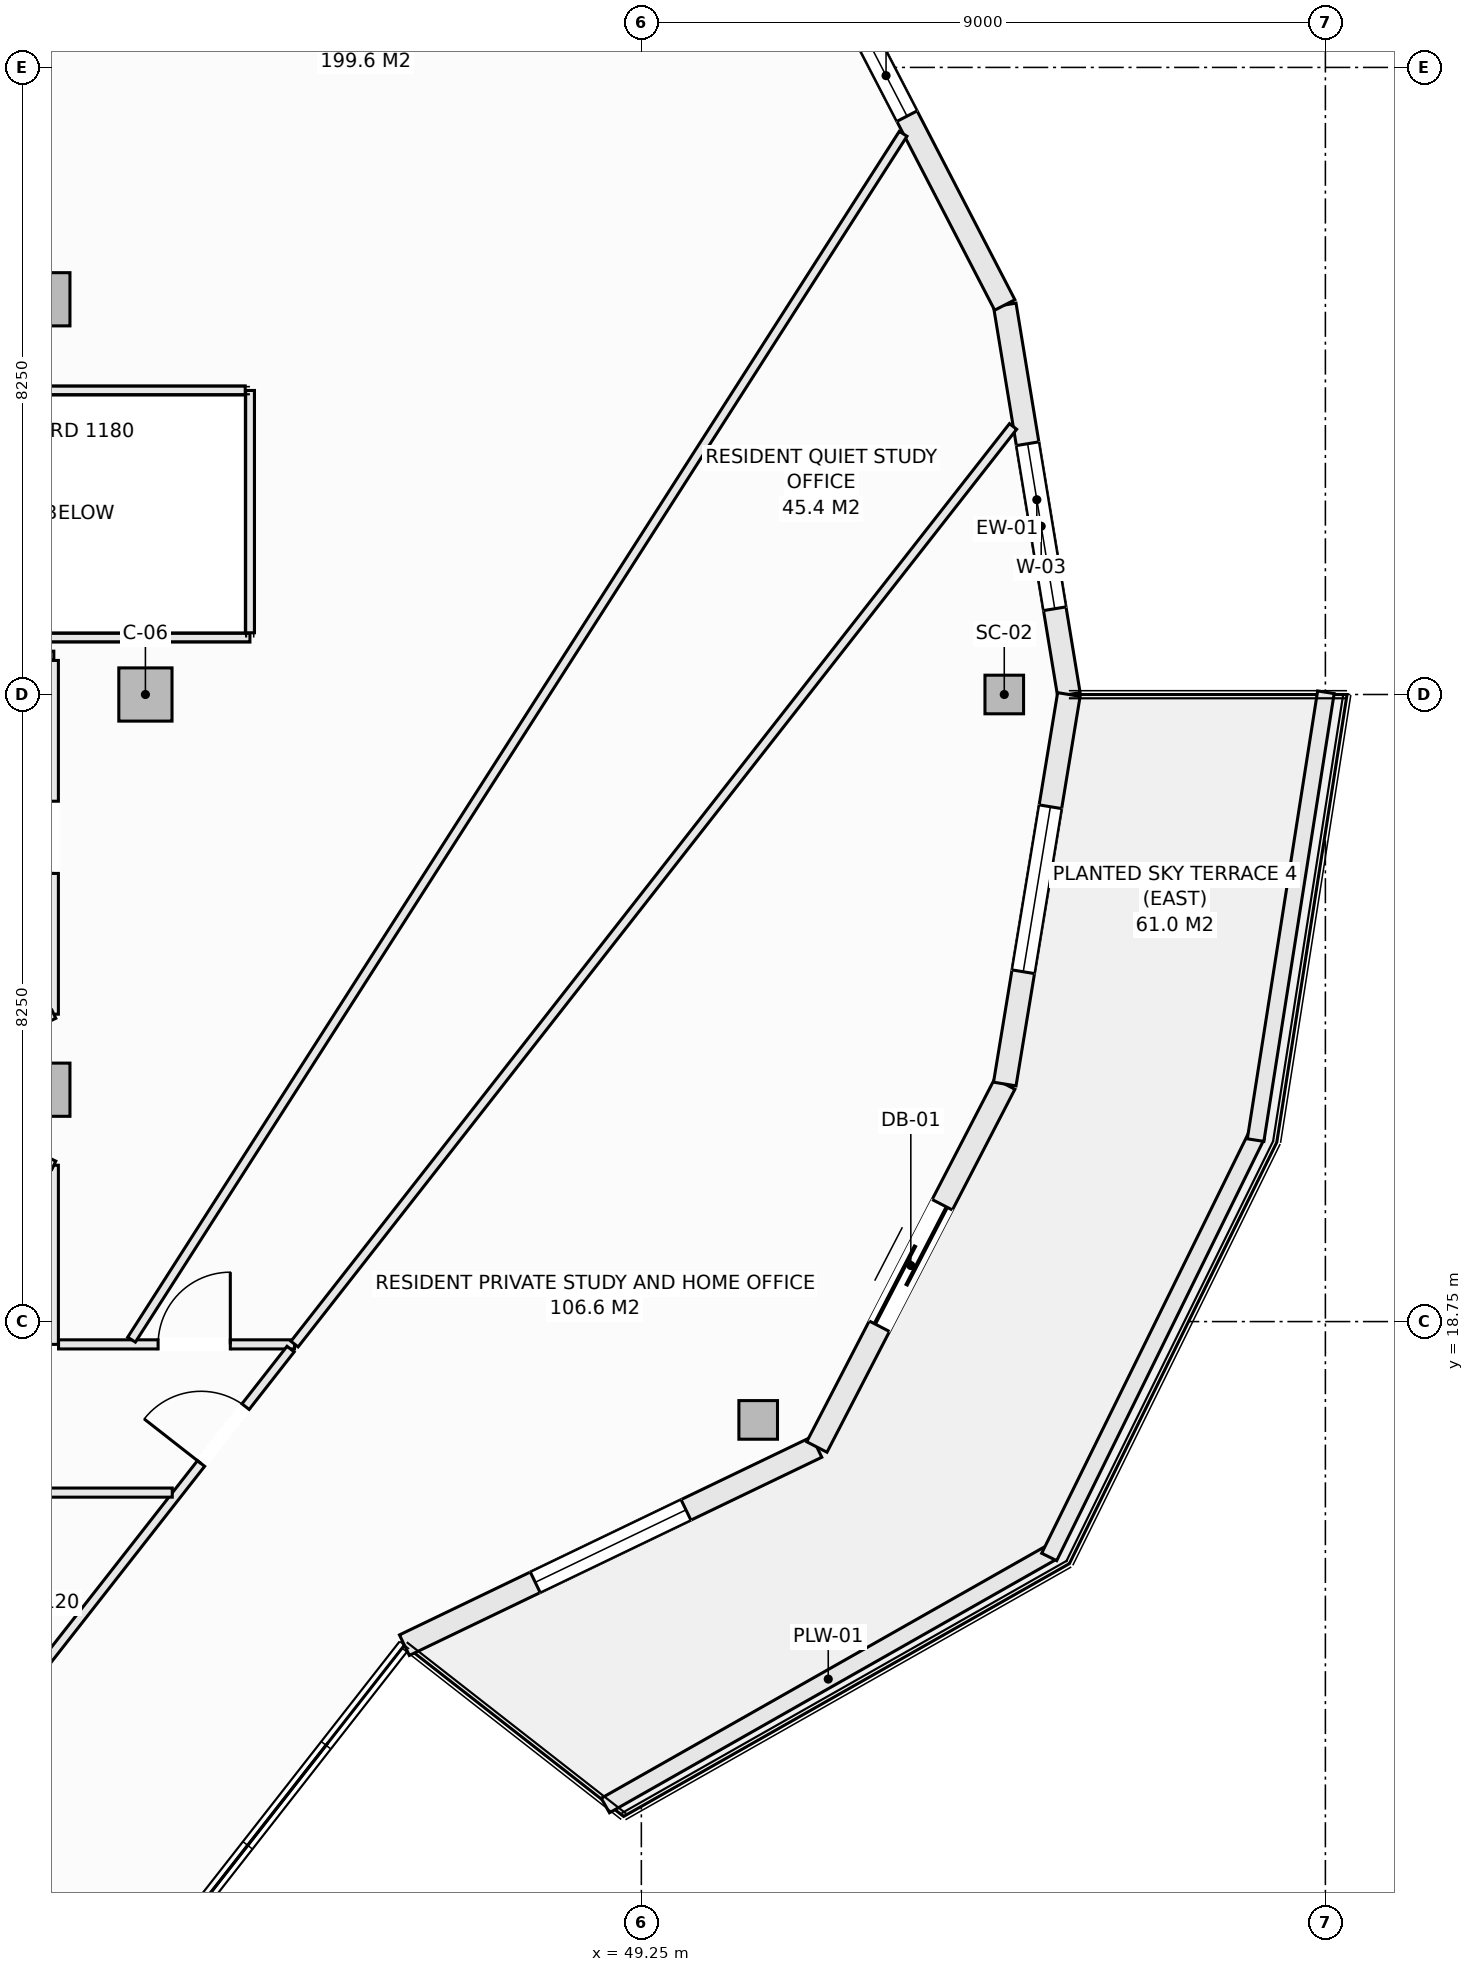
"""IFC4 building model, lengths in metres.
Left out: names, types, materials, properties, quantities, classifications, styles, units other than length and angle.
Written with IfcOpenShell. Run it as: python <this file> out.ifc"""

import sys

from ifc_helpers import new_model, si_unit, direction, frame, frame_2d, origin, origin_2d, place, context, subcontext, project, spatial, rectangle, hollow_rectangle, extrude, element, fill, save


model = new_model("IFC4")
c1 = context("Model", 3, precision=1e-05, world=origin(), true_north=direction((0.0, 1.0)))
c2 = subcontext(c1, "Body", "Model", "MODEL_VIEW")
j1 = project(units=[si_unit("LENGTHUNIT", "METRE"), si_unit("PLANEANGLEUNIT", "RADIAN")], contexts=[c1])
p1 = place(None, origin())
s1 = spatial("IfcSite", under=j1, at=p1, CompositionType="ELEMENT")
p2 = place(p1, origin())
s2 = spatial("IfcBuilding", under=s1, at=p2, CompositionType="ELEMENT")
p3 = place(p2, frame((0.0, 0.0, 212.9)))
s3 = spatial("IfcBuildingStorey", under=s2, at=p3, CompositionType="ELEMENT", Elevation=212.9)
for number, where, z_axis, x_axis in (
    (1, (54.025, 27.0, -0.27), (0.0, 0.0, 1.0), (1.0, 0.0, 0.0)),
    (2, (50.787, 17.456, -0.27), (0.0, 0.0, 1.0), (1.0, 0.0, 0.0)),
):
    element("IfcColumn", number, at=place(p3, frame(where, z_axis=z_axis, x_axis=x_axis)), inside=s3, PredefinedType="COLUMN", context=c2, shape_type="SweptSolid", body=[
        extrude(hollow_rectangle(XDim=0.508, YDim=0.508, WallThickness=0.019, at=origin_2d()), origin(), (0.0, 0.0, 1.0), 3.3),
    ])
for number, where, z_axis, x_axis in (
    (3, (42.725, 27.0, -0.27), (0.0, 0.0, 1.0), (1.0, 0.0, 0.0)),
    (4, (41.382, 32.199, -0.27), (0.0, 0.0, 1.0), (1.0, 0.0, 0.0)),
    (5, (41.382, 21.801, -0.27), (0.0, 0.0, 1.0), (1.0, 0.0, 0.0)),
):
    element("IfcColumn", number, at=place(p3, frame(where, z_axis=z_axis, x_axis=x_axis)), inside=s3, PredefinedType="COLUMN", context=c2, shape_type="SweptSolid", body=[
        extrude(rectangle(XDim=0.7, YDim=0.7, at=origin_2d()), origin(), (0.0, 0.0, 1.0), 3.3),
    ])
p4 = place(p3, frame((54.032, 32.125, 0.0), z_axis=(0.0, 0.0, 1.0), x_axis=(0.16237087798, -0.986729799886, 0.0)))
e6 = element("IfcWall", 6, at=p4, inside=s3, PredefinedType="SOLIDWALL", context=c2, shape_type="SweptSolid", body=[
    extrude(rectangle(XDim=5.193, YDim=0.3, at=frame_2d((2.597, 0.0))), origin(), (0.0, 0.0, 1.0), 2.605),
])
p5 = place(p4, frame((1.85, 0.0, 0.72)))
e7 = element("IfcOpeningElement", 7, at=p5, cuts=e6, PredefinedType="OPENING", context=c2, shape_type="SweptSolid", body=[
    extrude(rectangle(XDim=2.2, YDim=1.65, at=frame_2d((1.1, 0.825))), frame((0.0, 0.16, 0.0), z_axis=(0.0, -1.0, 0.0), x_axis=(1.0, 0.0, 0.0)), (0.0, 0.0, 1.0), 0.32),
])
p6 = place(p3, frame((51.559, 36.9, 0.0), z_axis=(0.0, 0.0, 1.0), x_axis=(0.459808219482, -0.888018243786, 0.0)))
e8 = element("IfcWall", 8, at=p6, inside=s3, PredefinedType="SOLIDWALL", context=c2, shape_type="SweptSolid", body=[
    extrude(rectangle(XDim=5.378, YDim=0.3, at=frame_2d((2.689, 0.0))), origin(), (0.0, 0.0, 1.0), 2.605),
])
p7 = place(p6, frame((1.38, 0.0, 0.72)))
e9 = element("IfcOpeningElement", 9, at=p7, cuts=e8, PredefinedType="OPENING", context=c2, shape_type="SweptSolid", body=[
    extrude(rectangle(XDim=1.2, YDim=1.65, at=frame_2d((0.6, 0.825))), frame((0.0, 0.16, 0.0), z_axis=(0.0, -1.0, 0.0), x_axis=(1.0, 0.0, 0.0)), (0.0, 0.0, 1.0), 0.32),
])
p8 = place(p3, frame((46.133, 14.493, 0.0), z_axis=(0.0, 0.0, 1.0), x_axis=(0.901348331142, 0.433094892545, 0.0)))
e10 = element("IfcWall", 10, at=p8, inside=s3, PredefinedType="SOLIDWALL", context=c2, shape_type="SweptSolid", body=[
    extrude(rectangle(XDim=6.021, YDim=0.3, at=frame_2d((3.01, 0.0))), origin(), (0.0, 0.0, 1.0), 2.605),
])
p9 = place(p8, frame((1.91, 0.0, 0.72)))
e11 = element("IfcOpeningElement", 11, at=p9, cuts=e10, PredefinedType="OPENING", context=c2, shape_type="SweptSolid", body=[
    extrude(rectangle(XDim=2.2, YDim=1.65, at=frame_2d((1.1, 0.825))), frame((0.0, 0.16, 0.0), z_axis=(0.0, -1.0, 0.0), x_axis=(1.0, 0.0, 0.0)), (0.0, 0.0, 1.0), 0.32),
])
p10 = place(p3, frame((51.559, 17.1, 0.0), z_axis=(0.0, 0.0, 1.0), x_axis=(0.459808219482, 0.888018243786, 0.0)))
e12 = element("IfcWall", 12, at=p10, inside=s3, PredefinedType="SOLIDWALL", context=c2, shape_type="SweptSolid", body=[
    extrude(rectangle(XDim=5.378, YDim=0.3, at=frame_2d((2.689, 0.0))), origin(), (0.0, 0.0, 1.0), 2.605),
])
p11 = place(p10, frame((1.789, 0.0, 0.0)))
e13 = element("IfcOpeningElement", 13, at=p11, cuts=e12, PredefinedType="OPENING", context=c2, shape_type="SweptSolid", body=[
    extrude(rectangle(XDim=1.8, YDim=2.25, at=frame_2d((0.9, 1.125))), frame((0.0, 0.16, 0.0), z_axis=(0.0, -1.0, 0.0), x_axis=(1.0, 0.0, 0.0)), (0.0, 0.0, 1.0), 0.32),
])
p12 = place(p3, frame((54.032, 21.875, 0.0), z_axis=(0.0, 0.0, 1.0), x_axis=(0.16237087798, 0.986729799886, 0.0)))
e14 = element("IfcWall", 14, at=p12, inside=s3, PredefinedType="SOLIDWALL", context=c2, shape_type="SweptSolid", body=[
    extrude(rectangle(XDim=5.193, YDim=0.3, at=frame_2d((2.597, 0.0))), origin(), (0.0, 0.0, 1.0), 2.605),
])
p13 = place(p12, frame((1.497, 0.0, 0.72)))
e15 = element("IfcOpeningElement", 15, at=p13, cuts=e14, PredefinedType="OPENING", context=c2, shape_type="SweptSolid", body=[
    extrude(rectangle(XDim=2.2, YDim=1.65, at=frame_2d((1.1, 0.825))), frame((0.0, 0.16, 0.0), z_axis=(0.0, -1.0, 0.0), x_axis=(1.0, 0.0, 0.0)), (0.0, 0.0, 1.0), 0.32),
])
p14 = place(p3, frame((48.776, 12.383, 0.0), z_axis=(0.0, 0.0, 1.0), x_axis=(0.869860619267, 0.493297580623, 0.0)))
e16 = element("IfcWall", 16, at=p14, inside=s3, PredefinedType="PARAPET", context=c2, shape_type="SweptSolid", body=[
    extrude(rectangle(XDim=6.743, YDim=0.22, at=frame_2d((3.371, 0.0))), origin(), (0.0, 0.0, 1.0), 0.52),
])
p15 = place(p3, frame((54.616, 15.653, 0.0), z_axis=(0.0, 0.0, 1.0), x_axis=(0.441640961804, 0.897191875162, 0.0)))
e17 = element("IfcWall", 17, at=p15, inside=s3, PredefinedType="PARAPET", context=c2, shape_type="SweptSolid", body=[
    extrude(rectangle(XDim=6.178, YDim=0.22, at=frame_2d((3.089, 0.0))), origin(), (0.0, 0.0, 1.0), 0.52),
])
p16 = place(p3, frame((57.332, 21.138, 0.0), z_axis=(0.0, 0.0, 1.0), x_axis=(0.1550711793, 0.987903299595, 0.0)))
e18 = element("IfcWall", 18, at=p16, inside=s3, PredefinedType="PARAPET", context=c2, shape_type="SweptSolid", body=[
    extrude(rectangle(XDim=5.964, YDim=0.22, at=frame_2d((2.982, 0.0))), origin(), (0.0, 0.0, 1.0), 0.52),
])
p17 = place(p3, frame((39.662, 27.51, 0.0), z_axis=(0.0, 0.0, 1.0), x_axis=(1.0, 0.0, 0.0)))
e19 = element("IfcWall", 19, at=p17, inside=s3, PredefinedType="PARTITIONING", context=c2, shape_type="SweptSolid", body=[
    extrude(rectangle(XDim=1.858, YDim=0.12, at=frame_2d((0.929, 0.0))), origin(), (0.0, 0.0, 1.0), 3.03),
])
p18 = place(p3, frame((41.52, 18.45, 0.0), z_axis=(0.0, 0.0, 1.0), x_axis=(0.0, 1.0, 0.0)))
e20 = element("IfcWall", 20, at=p18, inside=s3, PredefinedType="PARTITIONING", context=c2, shape_type="SweptSolid", body=[
    extrude(rectangle(XDim=2.357, YDim=0.12, at=frame_2d((1.178, 0.0))), origin(), (0.0, 0.0, 1.0), 3.03),
])
p19 = place(p3, frame((41.52, 22.794, 0.0), z_axis=(0.0, 0.0, 1.0), x_axis=(0.0, 1.0, 0.0)))
e21 = element("IfcWall", 21, at=p19, inside=s3, PredefinedType="PARTITIONING", context=c2, shape_type="SweptSolid", body=[
    extrude(rectangle(XDim=4.654, YDim=0.12, at=frame_2d((2.327, 0.0))), origin(), (0.0, 0.0, 1.0), 2.478),
])
p20 = place(p19, frame((1.852, 0.0, 0.0)))
e22 = element("IfcOpeningElement", 22, at=p20, cuts=e21, PredefinedType="OPENING", context=c2, shape_type="SweptSolid", body=[
    extrude(rectangle(XDim=0.95, YDim=2.1, at=frame_2d((0.475, 1.05))), frame((0.0, 0.07, 0.0), z_axis=(0.0, -1.0, 0.0), x_axis=(1.0, 0.0, 0.0)), (0.0, 0.0, 1.0), 0.14),
])
for number, where, z_axis, x_axis in (
    (23, (40.986, 22.541, 0.0), (0.0, 0.0, 1.0), (0.904, 0.428, 0.0)),
    (24, (40.986, 21.06, 0.0), (0.0, 0.0, 1.0), (0.904, -0.428, 0.0)),
):
    element("IfcWall", number, at=place(p3, frame(where, z_axis=z_axis, x_axis=x_axis)), inside=s3, PredefinedType="PARTITIONING", context=c2, shape_type="SweptSolid", body=[
        extrude(rectangle(XDim=0.591, YDim=0.12, at=frame_2d((0.295, 0.0))), origin(), (0.0, 0.0, 1.0), 3.03),
    ])
p21 = place(p3, frame((41.582, 18.45, 0.0), z_axis=(0.0, 0.0, 1.0), x_axis=(1.0, 0.0, 0.0)))
e25 = element("IfcWall", 25, at=p21, inside=s3, PredefinedType="PARTITIONING", context=c2, shape_type="SweptSolid", body=[
    extrude(rectangle(XDim=3.105, YDim=0.12, at=frame_2d((1.552, 0.0))), origin(), (0.0, 0.0, 1.0), 3.03),
])
p22 = place(p21, frame((1.31, 0.0, 0.0)))
e26 = element("IfcOpeningElement", 26, at=p22, cuts=e25, PredefinedType="OPENING", context=c2, shape_type="SweptSolid", body=[
    extrude(rectangle(XDim=0.95, YDim=2.1, at=frame_2d((0.475, 1.05))), frame((0.0, 0.07, 0.0), z_axis=(0.0, -1.0, 0.0), x_axis=(1.0, 0.0, 0.0)), (0.0, 0.0, 1.0), 0.14),
])
p23 = place(p3, frame((36.527, 8.034, 0.0), z_axis=(0.0, 0.0, 1.0), x_axis=(0.616547497682, 0.787317714206, 0.0)))
e27 = element("IfcWall", 27, at=p23, inside=s3, PredefinedType="PARTITIONING", context=c2, shape_type="SweptSolid", body=[
    extrude(rectangle(XDim=13.151, YDim=0.12, at=frame_2d((6.576, 0.0))), origin(), (0.0, 0.0, 1.0), 3.03),
])
p24 = place(p23, frame((11.24, 0.0, 0.0)))
e28 = element("IfcOpeningElement", 28, at=p24, cuts=e27, PredefinedType="OPENING", context=c2, shape_type="SweptSolid", body=[
    extrude(rectangle(XDim=0.95, YDim=2.1, at=frame_2d((0.475, 1.05))), frame((0.0, 0.07, 0.0), z_axis=(0.0, -1.0, 0.0), x_axis=(1.0, 0.0, 0.0)), (0.0, 0.0, 1.0), 0.14),
])
p25 = place(p3, frame((44.687, 18.454, 0.0), z_axis=(0.0, 0.0, 1.0), x_axis=(0.616533198311, 0.787328911815, 0.0)))
e29 = element("IfcWall", 29, at=p25, inside=s3, PredefinedType="PARTITIONING", context=c2, shape_type="SweptSolid", body=[
    extrude(rectangle(XDim=15.333, YDim=0.12, at=frame_2d((7.667, 0.0))), origin(), (0.0, 0.0, 1.0), 3.03),
])
p26 = place(p3, frame((39.662, 16.5, 0.0), z_axis=(0.0, 0.0, 1.0), x_axis=(1.0, 0.0, 0.0)))
e30 = element("IfcWall", 30, at=p26, inside=s3, PredefinedType="PARTITIONING", context=c2, shape_type="SweptSolid", body=[
    extrude(rectangle(XDim=3.416, YDim=0.12, at=frame_2d((1.708, 0.0))), origin(), (0.0, 0.0, 1.0), 2.77),
])
p27 = place(p3, frame((42.542, 18.512, 0.0), z_axis=(0.0, 0.0, 1.0), x_axis=(0.538988222434, 0.842313300428, 0.0)))
e31 = element("IfcWall", 31, at=p27, inside=s3, PredefinedType="PARTITIONING", context=c2, shape_type="SweptSolid", body=[
    extrude(rectangle(XDim=18.835, YDim=0.12, at=frame_2d((9.417, 0.0))), origin(), (0.0, 0.0, 1.0), 3.03),
])
p28 = place(p3, frame((39.146, 27.75, 0.0), z_axis=(0.0, 0.0, 1.0), x_axis=(1.0, 0.0, 0.0)))
e32 = element("IfcWall", 32, at=p28, inside=s3, PredefinedType="PARTITIONING", context=c2, shape_type="SweptSolid", body=[
    extrude(rectangle(XDim=4.955, YDim=0.12, at=frame_2d((2.477, 0.0))), origin(), (0.0, 0.0, 1.0), 3.03),
])
p29 = place(p3, frame((44.1, 27.812, 0.0), z_axis=(0.0, 0.0, 1.0), x_axis=(0.0, 1.0, 0.0)))
e33 = element("IfcWall", 33, at=p29, inside=s3, PredefinedType="PARTITIONING", context=c2, shape_type="SweptSolid", body=[
    extrude(rectangle(XDim=3.188, YDim=0.12, at=frame_2d((1.594, 0.0))), origin(), (0.0, 0.0, 1.0), 3.03),
])
p30 = place(p3, frame((38.738, 31.0, 0.0), z_axis=(0.0, 0.0, 1.0), x_axis=(1.0, 0.0, 0.0)))
e34 = element("IfcWall", 34, at=p30, inside=s3, PredefinedType="PARTITIONING", context=c2, shape_type="SweptSolid", body=[
    extrude(rectangle(XDim=5.3, YDim=0.12, at=frame_2d((2.65, 0.0))), origin(), (0.0, 0.0, 1.0), 3.03),
])
p31 = place(p5, origin())
e35 = element("IfcWindow", 35, at=p31, inside=s3, PartitioningType="SINGLE_PANEL", PredefinedType="WINDOW", context=c2, shape_type="SweptSolid", body=[
    extrude(rectangle(XDim=2.2, YDim=1.65, at=frame_2d((1.1, 0.825))), frame((0.0, 0.03, 0.0), z_axis=(0.0, -1.0, 0.0), x_axis=(1.0, 0.0, 0.0)), (0.0, 0.0, 1.0), 0.06),
])
fill(e7, e35)
p32 = place(p7, origin())
e36 = element("IfcWindow", 36, at=p32, inside=s3, PartitioningType="SINGLE_PANEL", PredefinedType="WINDOW", context=c2, shape_type="SweptSolid", body=[
    extrude(rectangle(XDim=1.2, YDim=1.65, at=frame_2d((0.6, 0.825))), frame((0.0, 0.03, 0.0), z_axis=(0.0, -1.0, 0.0), x_axis=(1.0, 0.0, 0.0)), (0.0, 0.0, 1.0), 0.06),
])
fill(e9, e36)
p33 = place(p9, origin())
e37 = element("IfcWindow", 37, at=p33, inside=s3, PartitioningType="SINGLE_PANEL", PredefinedType="WINDOW", context=c2, shape_type="SweptSolid", body=[
    extrude(rectangle(XDim=2.2, YDim=1.65, at=frame_2d((1.1, 0.825))), frame((0.0, 0.03, 0.0), z_axis=(0.0, -1.0, 0.0), x_axis=(1.0, 0.0, 0.0)), (0.0, 0.0, 1.0), 0.06),
])
fill(e11, e37)
p34 = place(p11, frame((1.8, 0.0, 0.0), z_axis=(0.0, 0.0, 1.0), x_axis=(-1.0, 0.0, 0.0)))
e38 = element("IfcDoor", 38, at=p34, inside=s3, OperationType="SLIDING_TO_LEFT", PredefinedType="DOOR", context=c2, shape_type="SweptSolid", body=[
    extrude(rectangle(XDim=1.8, YDim=2.25, at=frame_2d((0.9, 1.125))), frame((0.0, 0.025, 0.0), z_axis=(0.0, -1.0, 0.0), x_axis=(1.0, 0.0, 0.0)), (0.0, 0.0, 1.0), 0.05),
])
fill(e13, e38)
p35 = place(p13, origin())
e39 = element("IfcWindow", 39, at=p35, inside=s3, PartitioningType="SINGLE_PANEL", PredefinedType="WINDOW", context=c2, shape_type="SweptSolid", body=[
    extrude(rectangle(XDim=2.2, YDim=1.65, at=frame_2d((1.1, 0.825))), frame((0.0, 0.03, 0.0), z_axis=(0.0, -1.0, 0.0), x_axis=(1.0, 0.0, 0.0)), (0.0, 0.0, 1.0), 0.06),
])
fill(e15, e39)
p36 = place(p24, origin())
e40 = element("IfcDoor", 40, at=p36, inside=s3, OperationType="SINGLE_SWING_LEFT", PredefinedType="DOOR", context=c2, shape_type="SweptSolid", body=[
    extrude(rectangle(XDim=0.95, YDim=2.1, at=frame_2d((0.475, 1.05))), frame((0.0, 0.025, 0.0), z_axis=(0.0, -1.0, 0.0), x_axis=(1.0, 0.0, 0.0)), (0.0, 0.0, 1.0), 0.05),
])
fill(e28, e40)
p37 = place(p22, origin())
e41 = element("IfcDoor", 41, at=p37, inside=s3, OperationType="SINGLE_SWING_RIGHT", PredefinedType="DOOR", context=c2, shape_type="SweptSolid", body=[
    extrude(rectangle(XDim=0.95, YDim=2.1, at=frame_2d((0.475, 1.05))), frame((0.0, 0.025, 0.0), z_axis=(0.0, -1.0, 0.0), x_axis=(1.0, 0.0, 0.0)), (0.0, 0.0, 1.0), 0.05),
])
fill(e26, e41)
p38 = place(p20, origin())
e42 = element("IfcDoor", 42, at=p38, inside=s3, OperationType="SINGLE_SWING_LEFT", PredefinedType="DOOR", context=c2, shape_type="SweptSolid", body=[
    extrude(rectangle(XDim=0.95, YDim=2.1, at=frame_2d((0.475, 1.05))), frame((0.0, 0.025, 0.0), z_axis=(0.0, -1.0, 0.0), x_axis=(1.0, 0.0, 0.0)), (0.0, 0.0, 1.0), 0.05),
])
fill(e22, e42)
save(model, sys.argv[1])
